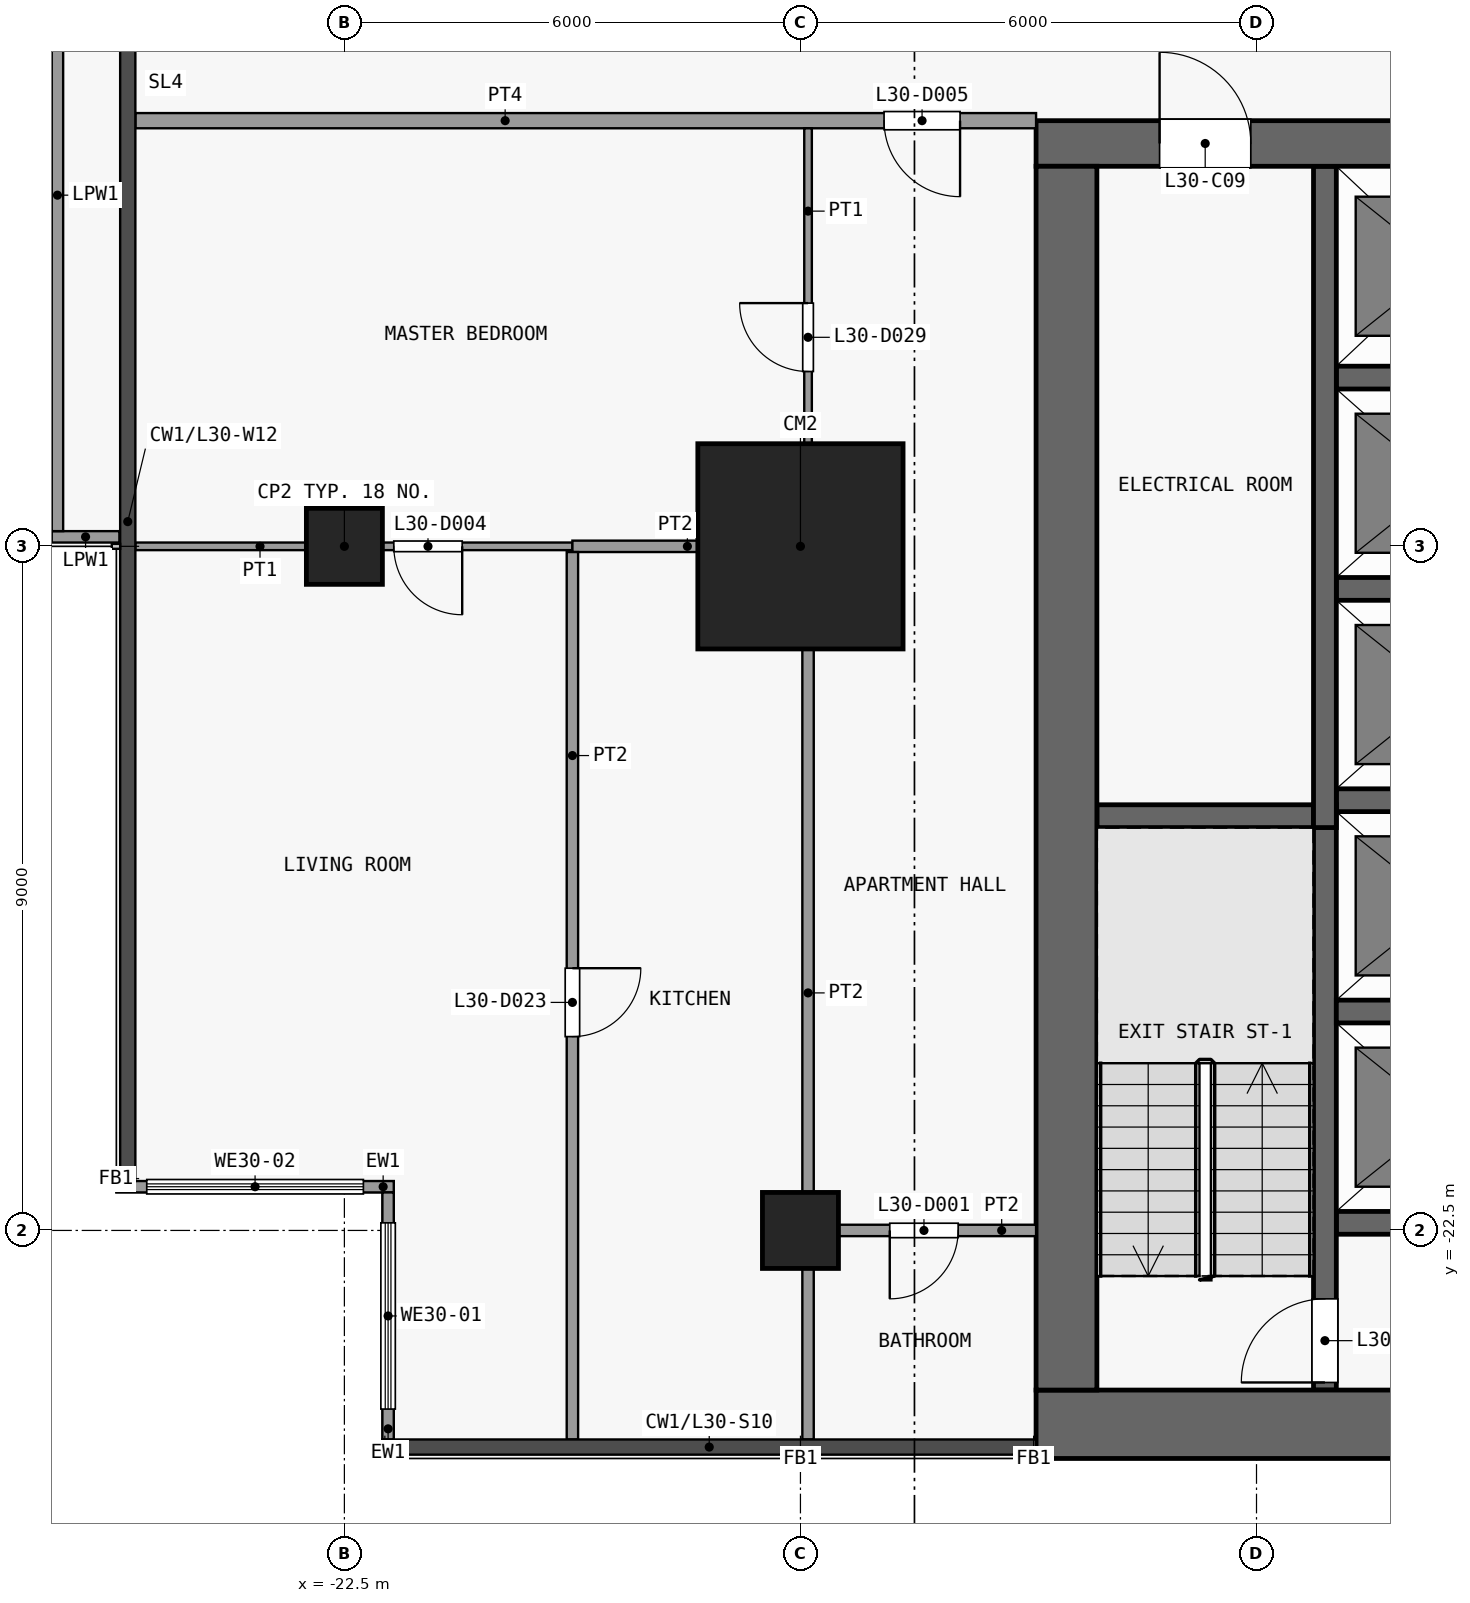
"""IFC4 building model, lengths in metres.
Left out: names, types, materials, properties, quantities, classifications, styles, units other than length and angle.
Written with IfcOpenShell. Run it as: python <this file> out.ifc"""

import sys

from ifc_helpers import new_model, si_unit, direction, frame, frame_2d, origin, origin_2d, place, context, subcontext, project, spatial, rectangle, extrude, element, fill, save


model = new_model("IFC4")
c1 = context("Model", 3, precision=1e-05, world=origin(), true_north=direction((0.0, 1.0)))
c2 = subcontext(c1, "Body", "Model", "MODEL_VIEW")
j1 = project(units=[si_unit("LENGTHUNIT", "METRE"), si_unit("PLANEANGLEUNIT", "RADIAN")], contexts=[c1])
p1 = place(None, origin())
s1 = spatial("IfcSite", under=j1, at=p1, CompositionType="ELEMENT")
p2 = place(p1, origin())
s2 = spatial("IfcBuilding", under=s1, at=p2, CompositionType="ELEMENT")
p3 = place(p2, frame((0.0, 0.0, 120.7)))
s3 = spatial("IfcBuildingStorey", under=s2, at=p3, CompositionType="ELEMENT", Elevation=120.7)
for number, where, z_axis, x_axis in (
    (1, (-22.5, -13.5, 0.0), (0.0, 0.0, 1.0), (1.0, 0.0, 0.0)),
    (2, (-16.5, -22.5, 0.0), (0.0, 0.0, 1.0), (1.0, 0.0, 0.0)),
):
    element("IfcColumn", number, at=place(p3, frame(where, z_axis=z_axis, x_axis=x_axis)), inside=s3, PredefinedType="COLUMN", context=c2, shape_type="SweptSolid", body=[
        extrude(rectangle(XDim=1.0, YDim=1.0, at=origin_2d()), origin(), (0.0, 0.0, 1.0), 3.6),
    ])
p4 = place(p3, frame((-16.5, -13.5, 0.0), z_axis=(0.0, 0.0, 1.0), x_axis=(1.0, 0.0, 0.0)))
e3 = element("IfcColumn", 3, at=p4, inside=s3, PredefinedType="COLUMN", context=c2, shape_type="SweptSolid", body=[
    extrude(rectangle(XDim=2.7, YDim=2.7, at=origin_2d()), origin(), (0.0, 0.0, 1.0), 3.6),
])
p5 = place(p3, frame((-13.4, -25.05, 0.0), z_axis=(0.0, 0.0, 1.0), x_axis=(1.0, 0.0, 0.0)))
e4 = element("IfcWall", 4, at=p5, inside=s3, PredefinedType="SHEAR", context=c2, shape_type="SweptSolid", body=[
    extrude(rectangle(XDim=26.8, YDim=0.9, at=frame_2d((13.4, 0.0))), origin(), (0.0, 0.0, 1.0), 3.3),
])
p6 = place(p3, frame((-13.4, -8.2, 0.0), z_axis=(0.0, 0.0, 1.0), x_axis=(1.0, 0.0, 0.0)))
e5 = element("IfcWall", 5, at=p6, inside=s3, PredefinedType="SHEAR", context=c2, shape_type="SweptSolid", body=[
    extrude(rectangle(XDim=26.8, YDim=0.6, at=frame_2d((13.4, 0.0))), origin(), (0.0, 0.0, 1.0), 3.3),
])
p7 = place(p6, frame((7.7, 0.0, 0.0)))
e6 = element("IfcOpeningElement", 6, at=p7, cuts=e5, PredefinedType="OPENING", context=c2, shape_type="SweptSolid", body=[
    extrude(rectangle(XDim=1.8, YDim=2.1, at=frame_2d((0.9, 1.05))), frame((0.0, 0.31, 0.0), z_axis=(0.0, -1.0, 0.0), x_axis=(1.0, 0.0, 0.0)), (0.0, 0.0, 1.0), 0.62),
])
p8 = place(p6, frame((17.3, 0.0, 0.0)))
e7 = element("IfcOpeningElement", 7, at=p8, cuts=e5, PredefinedType="OPENING", context=c2, shape_type="SweptSolid", body=[
    extrude(rectangle(XDim=1.8, YDim=2.1, at=frame_2d((0.9, 1.05))), frame((0.0, 0.31, 0.0), z_axis=(0.0, -1.0, 0.0), x_axis=(1.0, 0.0, 0.0)), (0.0, 0.0, 1.0), 0.62),
])
p9 = place(p6, frame((1.625, 0.0, 0.0)))
e8 = element("IfcOpeningElement", 8, at=p9, cuts=e5, PredefinedType="OPENING", context=c2, shape_type="SweptSolid", body=[
    extrude(rectangle(XDim=1.2, YDim=2.1, at=frame_2d((0.6, 1.05))), frame((0.0, 0.31, 0.0), z_axis=(0.0, -1.0, 0.0), x_axis=(1.0, 0.0, 0.0)), (0.0, 0.0, 1.0), 0.62),
])
p10 = place(p6, frame((23.275, 0.0, 0.0)))
e9 = element("IfcOpeningElement", 9, at=p10, cuts=e5, PredefinedType="OPENING", context=c2, shape_type="SweptSolid", body=[
    extrude(rectangle(XDim=0.9, YDim=2.1, at=frame_2d((0.45, 1.05))), frame((0.0, 0.31, 0.0), z_axis=(0.0, -1.0, 0.0), x_axis=(1.0, 0.0, 0.0)), (0.0, 0.0, 1.0), 0.62),
])
p11 = place(p3, frame((-13.0, -24.6, 0.0), z_axis=(0.0, 0.0, 1.0), x_axis=(0.0, 1.0, 0.0)))
e10 = element("IfcWall", 10, at=p11, inside=s3, PredefinedType="SHEAR", context=c2, shape_type="SweptSolid", body=[
    extrude(rectangle(XDim=16.1, YDim=0.8, at=frame_2d((8.05, 0.0))), origin(), (0.0, 0.0, 1.0), 3.3),
])
for number, where, z_axis, x_axis in (
    (11, (-9.45, -22.4, 0.0), (0.0, 0.0, 1.0), (1.0, 0.0, 0.0)),
    (12, (-9.45, -19.62, 0.0), (0.0, 0.0, 1.0), (1.0, 0.0, 0.0)),
):
    element("IfcWall", number, at=place(p3, frame(where, z_axis=z_axis, x_axis=x_axis)), inside=s3, PredefinedType="SHEAR", context=c2, shape_type="SweptSolid", body=[
        extrude(rectangle(XDim=2.8, YDim=0.3, at=frame_2d((1.4, 0.0))), origin(), (0.0, 0.0, 1.0), 3.3),
    ])
p12 = place(p3, frame((-12.6, -17.05, 0.0), z_axis=(0.0, 0.0, 1.0), x_axis=(1.0, 0.0, 0.0)))
e13 = element("IfcWall", 13, at=p12, inside=s3, PredefinedType="SHEAR", context=c2, shape_type="SweptSolid", body=[
    extrude(rectangle(XDim=2.85, YDim=0.3, at=frame_2d((1.425, 0.0))), origin(), (0.0, 0.0, 1.0), 3.3),
])
for number, where, z_axis, x_axis in (
    (14, (-9.45, -16.84, 0.0), (0.0, 0.0, 1.0), (1.0, 0.0, 0.0)),
    (15, (-9.45, -14.06, 0.0), (0.0, 0.0, 1.0), (1.0, 0.0, 0.0)),
    (16, (-9.45, -11.28, 0.0), (0.0, 0.0, 1.0), (1.0, 0.0, 0.0)),
):
    element("IfcWall", number, at=place(p3, frame(where, z_axis=z_axis, x_axis=x_axis)), inside=s3, PredefinedType="SHEAR", context=c2, shape_type="SweptSolid", body=[
        extrude(rectangle(XDim=2.8, YDim=0.3, at=frame_2d((1.4, 0.0))), origin(), (0.0, 0.0, 1.0), 3.3),
    ])
p13 = place(p3, frame((-9.6, -24.6, 0.0), z_axis=(0.0, 0.0, 1.0), x_axis=(0.0, 1.0, 0.0)))
e17 = element("IfcWall", 17, at=p13, inside=s3, PredefinedType="SHEAR", context=c2, shape_type="SweptSolid", body=[
    extrude(rectangle(XDim=7.7, YDim=0.3, at=frame_2d((3.85, 0.0))), origin(), (0.0, 0.0, 1.0), 3.3),
])
p14 = place(p13, frame((0.1, 0.0, 0.0)))
e18 = element("IfcOpeningElement", 18, at=p14, cuts=e17, PredefinedType="OPENING", context=c2, shape_type="SweptSolid", body=[
    extrude(rectangle(XDim=1.1, YDim=2.1, at=frame_2d((0.55, 1.05))), frame((0.0, 0.16, 0.0), z_axis=(0.0, -1.0, 0.0), x_axis=(1.0, 0.0, 0.0)), (0.0, 0.0, 1.0), 0.32),
])
p15 = place(p3, frame((-9.6, -17.2, 0.0), z_axis=(0.0, 0.0, 1.0), x_axis=(0.0, 1.0, 0.0)))
e19 = element("IfcWall", 19, at=p15, inside=s3, PredefinedType="SHEAR", context=c2, shape_type="SweptSolid", body=[
    extrude(rectangle(XDim=8.7, YDim=0.3, at=frame_2d((4.35, 0.0))), origin(), (0.0, 0.0, 1.0), 3.3),
])
p16 = place(p3, frame((-21.925, -25.25, 0.0), z_axis=(0.0, 0.0, 1.0), x_axis=(0.0, 1.0, 0.0)))
e20 = element("IfcWall", 20, at=p16, inside=s3, PredefinedType="SOLIDWALL", context=c2, shape_type="SweptSolid", body=[
    extrude(rectangle(XDim=3.25, YDim=0.15, at=frame_2d((1.625, 0.0))), origin(), (0.0, 0.0, 1.0), 3.3),
])
p17 = place(p16, frame((0.4, 0.0, 0.9)))
e21 = element("IfcOpeningElement", 21, at=p17, cuts=e20, PredefinedType="OPENING", context=c2, shape_type="SweptSolid", body=[
    extrude(rectangle(XDim=2.45, YDim=2.4, at=frame_2d((1.225, 1.2))), frame((0.0, 0.085, 0.0), z_axis=(0.0, -1.0, 0.0), x_axis=(1.0, 0.0, 0.0)), (0.0, 0.0, 1.0), 0.17),
])
p18 = place(p3, frame((-21.85, -21.925, 0.0), z_axis=(0.0, 0.0, 1.0), x_axis=(-1.0, 0.0, 0.0)))
e22 = element("IfcWall", 22, at=p18, inside=s3, PredefinedType="SOLIDWALL", context=c2, shape_type="SweptSolid", body=[
    extrude(rectangle(XDim=3.65, YDim=0.15, at=frame_2d((1.825, 0.0))), origin(), (0.0, 0.0, 1.0), 3.3),
])
p19 = place(p18, frame((0.4, 0.0, 0.9)))
e23 = element("IfcOpeningElement", 23, at=p19, cuts=e22, PredefinedType="OPENING", context=c2, shape_type="SweptSolid", body=[
    extrude(rectangle(XDim=2.85, YDim=2.4, at=frame_2d((1.425, 1.2))), frame((0.0, 0.085, 0.0), z_axis=(0.0, -1.0, 0.0), x_axis=(1.0, 0.0, 0.0)), (0.0, 0.0, 1.0), 0.17),
])
p20 = place(p3, frame((-25.46, -13.375, 0.0), z_axis=(0.0, 0.0, 1.0), x_axis=(-1.0, 0.0, 0.0)))
e24 = element("IfcWall", 24, at=p20, inside=s3, PredefinedType="PARAPET", context=c2, shape_type="SweptSolid", body=[
    extrude(rectangle(XDim=0.89, YDim=0.15, at=frame_2d((0.445, 0.0))), origin(), (0.0, 0.0, 1.0), 1.15),
])
p21 = place(p3, frame((-26.275, -13.3, 0.0), z_axis=(0.0, 0.0, 1.0), x_axis=(0.0, 1.0, 0.0)))
e25 = element("IfcWall", 25, at=p21, inside=s3, PredefinedType="PARAPET", context=c2, shape_type="SweptSolid", body=[
    extrude(rectangle(XDim=8.84, YDim=0.15, at=frame_2d((4.42, 0.0))), origin(), (0.0, 0.0, 1.0), 1.15),
])
p22 = place(p3, frame((-16.325, -22.5, 0.0), z_axis=(0.0, 0.0, 1.0), x_axis=(1.0, 0.0, 0.0)))
e26 = element("IfcWall", 26, at=p22, inside=s3, PredefinedType="PARTITIONING", context=c2, shape_type="SweptSolid", body=[
    extrude(rectangle(XDim=2.925, YDim=0.15, at=frame_2d((1.462, 0.0))), origin(), (0.0, 0.0, 1.0), 3.3),
])
p23 = place(p22, frame((1.0, 0.0, 0.0)))
e27 = element("IfcOpeningElement", 27, at=p23, cuts=e26, PredefinedType="OPENING", context=c2, shape_type="SweptSolid", body=[
    extrude(rectangle(XDim=0.9, YDim=2.1, at=frame_2d((0.45, 1.05))), frame((0.0, 0.085, 0.0), z_axis=(0.0, -1.0, 0.0), x_axis=(1.0, 0.0, 0.0)), (0.0, 0.0, 1.0), 0.17),
])
p24 = place(p3, frame((-25.25, -13.5, 0.0), z_axis=(0.0, 0.0, 1.0), x_axis=(1.0, 0.0, 0.0)))
e28 = element("IfcWall", 28, at=p24, inside=s3, PredefinedType="PARTITIONING", context=c2, shape_type="SweptSolid", body=[
    extrude(rectangle(XDim=5.75, YDim=0.1, at=frame_2d((2.875, 0.0))), origin(), (0.0, 0.0, 1.0), 3.3),
])
p25 = place(p24, frame((3.4, 0.0, 0.0)))
e29 = element("IfcOpeningElement", 29, at=p25, cuts=e28, PredefinedType="OPENING", context=c2, shape_type="SweptSolid", body=[
    extrude(rectangle(XDim=0.9, YDim=2.1, at=frame_2d((0.45, 1.05))), frame((0.0, 0.06, 0.0), z_axis=(0.0, -1.0, 0.0), x_axis=(1.0, 0.0, 0.0)), (0.0, 0.0, 1.0), 0.12),
])
p26 = place(p3, frame((-19.5, -13.5, 0.0), z_axis=(0.0, 0.0, 1.0), x_axis=(1.0, 0.0, 0.0)))
e30 = element("IfcWall", 30, at=p26, inside=s3, PredefinedType="PARTITIONING", context=c2, shape_type="SweptSolid", body=[
    extrude(rectangle(XDim=3.025, YDim=0.15, at=frame_2d((1.512, 0.0))), origin(), (0.0, 0.0, 1.0), 3.3),
])
p27 = place(p3, frame((-25.25, -7.9, 0.0), z_axis=(0.0, 0.0, 1.0), x_axis=(1.0, 0.0, 0.0)))
e31 = element("IfcWall", 31, at=p27, inside=s3, PredefinedType="PARTITIONING", context=c2, shape_type="SweptSolid", body=[
    extrude(rectangle(XDim=11.85, YDim=0.2, at=frame_2d((5.925, 0.0))), origin(), (0.0, 0.0, 1.0), 3.3),
])
p28 = place(p27, frame((9.85, 0.0, 0.0)))
e32 = element("IfcOpeningElement", 32, at=p28, cuts=e31, PredefinedType="OPENING", context=c2, shape_type="SweptSolid", body=[
    extrude(rectangle(XDim=1.0, YDim=2.1, at=frame_2d((0.5, 1.05))), frame((0.0, 0.11, 0.0), z_axis=(0.0, -1.0, 0.0), x_axis=(1.0, 0.0, 0.0)), (0.0, 0.0, 1.0), 0.22),
])
p29 = place(p3, frame((-19.5, -25.25, 0.0), z_axis=(0.0, 0.0, 1.0), x_axis=(0.0, 1.0, 0.0)))
e33 = element("IfcWall", 33, at=p29, inside=s3, PredefinedType="PARTITIONING", context=c2, shape_type="SweptSolid", body=[
    extrude(rectangle(XDim=11.675, YDim=0.15, at=frame_2d((5.837, 0.0))), origin(), (0.0, 0.0, 1.0), 3.3),
])
p30 = place(p29, frame((5.3, 0.0, 0.0)))
e34 = element("IfcOpeningElement", 34, at=p30, cuts=e33, PredefinedType="OPENING", context=c2, shape_type="SweptSolid", body=[
    extrude(rectangle(XDim=0.9, YDim=2.1, at=frame_2d((0.45, 1.05))), frame((0.0, 0.085, 0.0), z_axis=(0.0, -1.0, 0.0), x_axis=(1.0, 0.0, 0.0)), (0.0, 0.0, 1.0), 0.17),
])
p31 = place(p3, frame((-16.4, -13.5, 0.0), z_axis=(0.0, 0.0, 1.0), x_axis=(0.0, 1.0, 0.0)))
e35 = element("IfcWall", 35, at=p31, inside=s3, PredefinedType="PARTITIONING", context=c2, shape_type="SweptSolid", body=[
    extrude(rectangle(XDim=5.5, YDim=0.1, at=frame_2d((2.75, 0.0))), origin(), (0.0, 0.0, 1.0), 3.3),
])
p32 = place(p31, frame((2.3, 0.0, 0.0)))
e36 = element("IfcOpeningElement", 36, at=p32, cuts=e35, PredefinedType="OPENING", context=c2, shape_type="SweptSolid", body=[
    extrude(rectangle(XDim=0.9, YDim=2.1, at=frame_2d((0.45, 1.05))), frame((0.0, 0.06, 0.0), z_axis=(0.0, -1.0, 0.0), x_axis=(1.0, 0.0, 0.0)), (0.0, 0.0, 1.0), 0.12),
])
p33 = place(p3, frame((-16.4, -25.25, 0.0), z_axis=(0.0, 0.0, 1.0), x_axis=(0.0, 1.0, 0.0)))
e37 = element("IfcWall", 37, at=p33, inside=s3, PredefinedType="PARTITIONING", context=c2, shape_type="SweptSolid", body=[
    extrude(rectangle(XDim=11.75, YDim=0.15, at=frame_2d((5.875, 0.0))), origin(), (0.0, 0.0, 1.0), 3.3),
])
p34 = place(p9, origin())
e38 = element("IfcDoor", 38, at=p34, inside=s3, OperationType="SINGLE_SWING_LEFT", PredefinedType="DOOR", context=c2, shape_type="SweptSolid", body=[
    extrude(rectangle(XDim=1.2, YDim=2.1, at=frame_2d((0.6, 1.05))), frame((0.0, 0.025, 0.0), z_axis=(0.0, -1.0, 0.0), x_axis=(1.0, 0.0, 0.0)), (0.0, 0.0, 1.0), 0.05),
])
fill(e8, e38)
p35 = place(p14, origin())
e39 = element("IfcDoor", 39, at=p35, inside=s3, OperationType="SINGLE_SWING_LEFT", PredefinedType="DOOR", context=c2, shape_type="SweptSolid", body=[
    extrude(rectangle(XDim=1.1, YDim=2.1, at=frame_2d((0.55, 1.05))), frame((0.0, 0.025, 0.0), z_axis=(0.0, -1.0, 0.0), x_axis=(1.0, 0.0, 0.0)), (0.0, 0.0, 1.0), 0.05),
])
fill(e18, e39)
p36 = place(p17, origin())
e40 = element("IfcWindow", 40, at=p36, inside=s3, PartitioningType="SINGLE_PANEL", PredefinedType="WINDOW", context=c2, shape_type="SweptSolid", body=[
    extrude(rectangle(XDim=2.45, YDim=2.4, at=frame_2d((1.225, 1.2))), frame((0.0, 0.03, 0.0), z_axis=(0.0, -1.0, 0.0), x_axis=(1.0, 0.0, 0.0)), (0.0, 0.0, 1.0), 0.06),
])
fill(e21, e40)
p37 = place(p19, origin())
e41 = element("IfcWindow", 41, at=p37, inside=s3, PartitioningType="SINGLE_PANEL", PredefinedType="WINDOW", context=c2, shape_type="SweptSolid", body=[
    extrude(rectangle(XDim=2.85, YDim=2.4, at=frame_2d((1.425, 1.2))), frame((0.0, 0.03, 0.0), z_axis=(0.0, -1.0, 0.0), x_axis=(1.0, 0.0, 0.0)), (0.0, 0.0, 1.0), 0.06),
])
fill(e23, e41)
p38 = place(p23, origin())
e42 = element("IfcDoor", 42, at=p38, inside=s3, OperationType="SINGLE_SWING_LEFT", PredefinedType="DOOR", context=c2, shape_type="SweptSolid", body=[
    extrude(rectangle(XDim=0.9, YDim=2.1, at=frame_2d((0.45, 1.05))), frame((0.0, 0.025, 0.0), z_axis=(0.0, -1.0, 0.0), x_axis=(1.0, 0.0, 0.0)), (0.0, 0.0, 1.0), 0.05),
])
fill(e27, e42)
p39 = place(p25, origin())
e43 = element("IfcDoor", 43, at=p39, inside=s3, OperationType="SINGLE_SWING_RIGHT", PredefinedType="DOOR", context=c2, shape_type="SweptSolid", body=[
    extrude(rectangle(XDim=0.9, YDim=2.1, at=frame_2d((0.45, 1.05))), frame((0.0, 0.025, 0.0), z_axis=(0.0, -1.0, 0.0), x_axis=(1.0, 0.0, 0.0)), (0.0, 0.0, 1.0), 0.05),
])
fill(e29, e43)
p40 = place(p28, origin())
e44 = element("IfcDoor", 44, at=p40, inside=s3, OperationType="SINGLE_SWING_RIGHT", PredefinedType="DOOR", context=c2, shape_type="SweptSolid", body=[
    extrude(rectangle(XDim=1.0, YDim=2.1, at=frame_2d((0.5, 1.05))), frame((0.0, 0.025, 0.0), z_axis=(0.0, -1.0, 0.0), x_axis=(1.0, 0.0, 0.0)), (0.0, 0.0, 1.0), 0.05),
])
fill(e32, e44)
p41 = place(p30, origin())
e45 = element("IfcDoor", 45, at=p41, inside=s3, OperationType="SINGLE_SWING_RIGHT", PredefinedType="DOOR", context=c2, shape_type="SweptSolid", body=[
    extrude(rectangle(XDim=0.9, YDim=2.1, at=frame_2d((0.45, 1.05))), frame((0.0, 0.025, 0.0), z_axis=(0.0, -1.0, 0.0), x_axis=(1.0, 0.0, 0.0)), (0.0, 0.0, 1.0), 0.05),
])
fill(e34, e45)
p42 = place(p32, origin())
e46 = element("IfcDoor", 46, at=p42, inside=s3, OperationType="SINGLE_SWING_LEFT", PredefinedType="DOOR", context=c2, shape_type="SweptSolid", body=[
    extrude(rectangle(XDim=0.9, YDim=2.1, at=frame_2d((0.45, 1.05))), frame((0.0, 0.025, 0.0), z_axis=(0.0, -1.0, 0.0), x_axis=(1.0, 0.0, 0.0)), (0.0, 0.0, 1.0), 0.05),
])
fill(e36, e46)
save(model, sys.argv[1])
